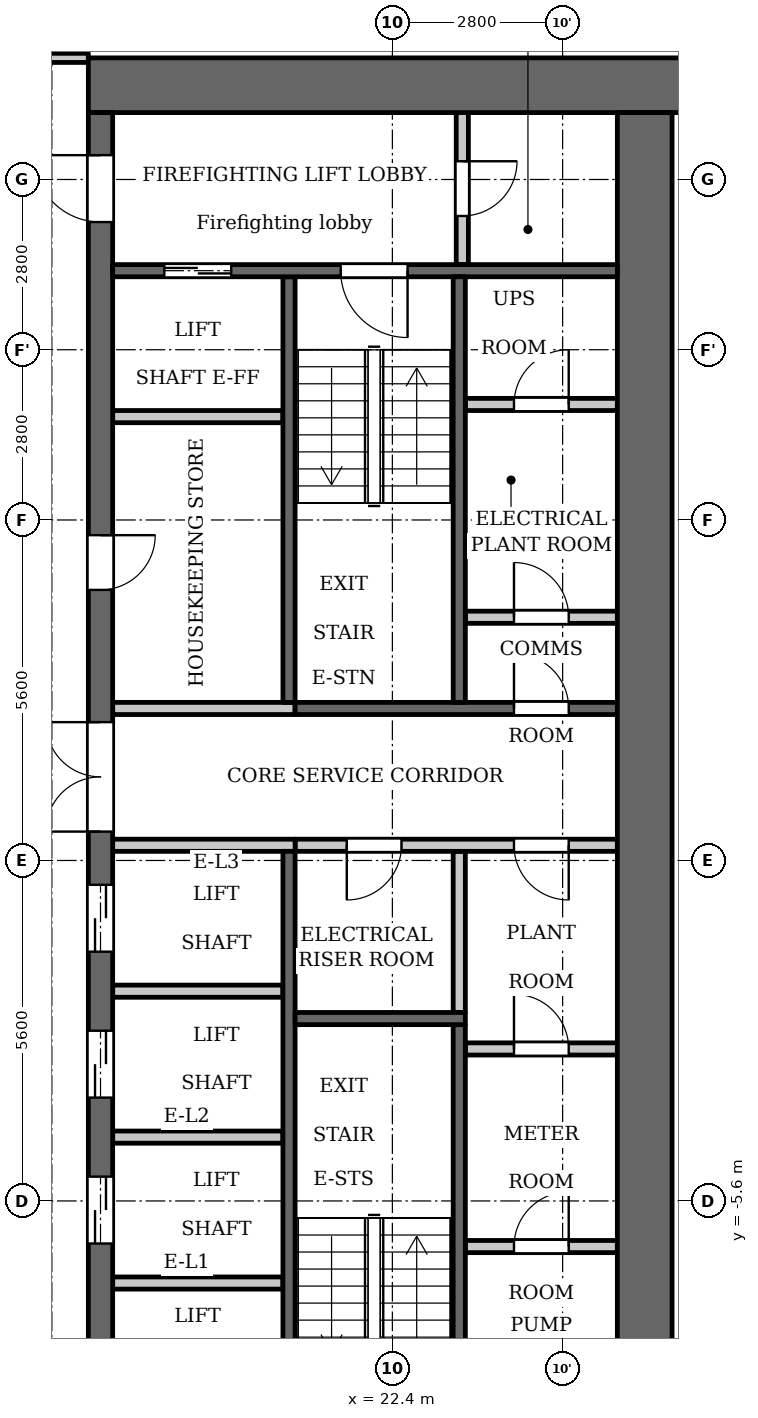
"""IFC4 building model, lengths in metres.
Left out: names, types, materials, properties, quantities, classifications, styles, units other than length and angle.
Written with IfcOpenShell. Run it as: python <this file> out.ifc"""

import sys

from ifc_helpers import new_model, si_unit, direction, frame, frame_2d, origin, place, context, subcontext, project, spatial, rectangle, extrude, element, fill, save


model = new_model("IFC4")
c1 = context("Model", 3, precision=1e-05, world=origin(), true_north=direction((0.0, 1.0)))
c2 = subcontext(c1, "Body", "Model", "MODEL_VIEW")
j1 = project(units=[si_unit("LENGTHUNIT", "METRE"), si_unit("PLANEANGLEUNIT", "RADIAN")], contexts=[c1])
p1 = place(None, origin())
s1 = spatial("IfcSite", under=j1, at=p1, CompositionType="ELEMENT")
p2 = place(p1, origin())
s2 = spatial("IfcBuilding", under=s1, at=p2, CompositionType="ELEMENT")
p3 = place(p2, frame((0.0, 0.0, 114.8)))
s3 = spatial("IfcBuildingStorey", under=s2, at=p3, CompositionType="ELEMENT", Elevation=114.8)
p4 = place(p3, frame((23.5, -2.5, 0.0), z_axis=(0.0, 0.0, 1.0), x_axis=(0.0, 1.0, 0.0)))
e1 = element("IfcWall", 1, at=p4, inside=s3, PredefinedType="PARTITIONING", context=c2, shape_type="SweptSolid", body=[
    extrude(rectangle(XDim=2.65, YDim=0.2, at=frame_2d((1.325, 0.0))), origin(), (0.0, 0.0, 1.0), 3.2),
])
p5 = place(p3, frame((20.7, 2.6, 0.0), z_axis=(0.0, 0.0, 1.0), x_axis=(0.0, 1.0, 0.0)))
e2 = element("IfcWall", 2, at=p5, inside=s3, PredefinedType="SHEAR", context=c2, shape_type="SweptSolid", body=[
    extrude(rectangle(XDim=7.0, YDim=0.2, at=frame_2d((3.5, 0.0))), origin(), (0.0, 0.0, 1.0), 3.2),
])
p6 = place(p3, frame((20.7, -9.6, 0.0), z_axis=(0.0, 0.0, 1.0), x_axis=(0.0, 1.0, 0.0)))
e3 = element("IfcWall", 3, at=p6, inside=s3, PredefinedType="SHEAR", context=c2, shape_type="SweptSolid", body=[
    extrude(rectangle(XDim=9.75, YDim=0.2, at=frame_2d((4.875, 0.0))), origin(), (0.0, 0.0, 1.0), 3.2),
])
p7 = place(p3, frame((20.8, 2.5, 0.0), z_axis=(0.0, 0.0, 1.0), x_axis=(1.0, 0.0, 0.0)))
e4 = element("IfcWall", 4, at=p7, inside=s3, PredefinedType="SHEAR", context=c2, shape_type="SweptSolid", body=[
    extrude(rectangle(XDim=5.3, YDim=0.2, at=frame_2d((2.65, 0.0))), origin(), (0.0, 0.0, 1.0), 3.2),
])
p8 = place(p7, frame((3.6, 0.0, 0.0)))
e5 = element("IfcOpeningElement", 5, at=p8, cuts=e4, PredefinedType="OPENING", context=c2, shape_type="SweptSolid", body=[
    extrude(rectangle(XDim=0.9, YDim=2.1, at=frame_2d((0.45, 1.05))), frame((0.0, 0.11, 0.0), z_axis=(0.0, -1.0, 0.0), x_axis=(1.0, 0.0, 0.0)), (0.0, 0.0, 1.0), 0.22),
])
p9 = place(p3, frame((20.8, 0.25, 0.0), z_axis=(0.0, 0.0, 1.0), x_axis=(1.0, 0.0, 0.0)))
e6 = element("IfcWall", 6, at=p9, inside=s3, PredefinedType="PARTITIONING", context=c2, shape_type="SweptSolid", body=[
    extrude(rectangle(XDim=5.3, YDim=0.2, at=frame_2d((2.65, 0.0))), origin(), (0.0, 0.0, 1.0), 3.2),
])
p10 = place(p9, frame((0.85, 0.0, 0.0)))
e7 = element("IfcOpeningElement", 7, at=p10, cuts=e6, PredefinedType="OPENING", context=c2, shape_type="SweptSolid", body=[
    extrude(rectangle(XDim=0.9, YDim=2.1, at=frame_2d((0.45, 1.05))), frame((0.0, 0.11, 0.0), z_axis=(0.0, -1.0, 0.0), x_axis=(1.0, 0.0, 0.0)), (0.0, 0.0, 1.0), 0.22),
])
p11 = place(p9, frame((3.6, 0.0, 0.0)))
e8 = element("IfcOpeningElement", 8, at=p11, cuts=e6, PredefinedType="OPENING", context=c2, shape_type="SweptSolid", body=[
    extrude(rectangle(XDim=0.9, YDim=2.1, at=frame_2d((0.45, 1.05))), frame((0.0, 0.11, 0.0), z_axis=(0.0, -1.0, 0.0), x_axis=(1.0, 0.0, 0.0)), (0.0, 0.0, 1.0), 0.22),
])
p12 = place(p3, frame((17.4, 12.75, 0.0), z_axis=(0.0, 0.0, 1.0), x_axis=(1.0, 0.0, 0.0)))
e9 = element("IfcWall", 9, at=p12, inside=s3, PredefinedType="SHEAR", context=c2, shape_type="SweptSolid", body=[
    extrude(rectangle(XDim=10.4, YDim=0.9, at=frame_2d((5.2, 0.0))), origin(), (0.0, 0.0, 1.0), 3.2),
])
p13 = place(p3, frame((17.6, -12.3, 0.0), z_axis=(0.0, 0.0, 1.0), x_axis=(0.0, 1.0, 0.0)))
e10 = element("IfcWall", 10, at=p13, inside=s3, PredefinedType="SHEAR", context=c2, shape_type="SweptSolid", body=[
    extrude(rectangle(XDim=24.6, YDim=0.4, at=frame_2d((12.3, 0.0))), origin(), (0.0, 0.0, 1.0), 3.2),
])
p14 = place(p13, frame((6.0, 0.0, 0.0)))
e11 = element("IfcOpeningElement", 11, at=p14, cuts=e10, PredefinedType="OPENING", context=c2, shape_type="SweptSolid", body=[
    extrude(rectangle(XDim=1.1, YDim=2.1, at=frame_2d((0.55, 1.05))), frame((0.0, 0.21, 0.0), z_axis=(0.0, -1.0, 0.0), x_axis=(1.0, 0.0, 0.0)), (0.0, 0.0, 1.0), 0.42),
])
p15 = place(p13, frame((8.4, 0.0, 0.0)))
e12 = element("IfcOpeningElement", 12, at=p15, cuts=e10, PredefinedType="OPENING", context=c2, shape_type="SweptSolid", body=[
    extrude(rectangle(XDim=1.1, YDim=2.1, at=frame_2d((0.55, 1.05))), frame((0.0, 0.21, 0.0), z_axis=(0.0, -1.0, 0.0), x_axis=(1.0, 0.0, 0.0)), (0.0, 0.0, 1.0), 0.42),
])
p16 = place(p13, frame((10.8, 0.0, 0.0)))
e13 = element("IfcOpeningElement", 13, at=p16, cuts=e10, PredefinedType="OPENING", context=c2, shape_type="SweptSolid", body=[
    extrude(rectangle(XDim=1.1, YDim=2.1, at=frame_2d((0.55, 1.05))), frame((0.0, 0.21, 0.0), z_axis=(0.0, -1.0, 0.0), x_axis=(1.0, 0.0, 0.0)), (0.0, 0.0, 1.0), 0.42),
])
p17 = place(p13, frame((16.75, 0.0, 0.0)))
e14 = element("IfcOpeningElement", 14, at=p17, cuts=e10, PredefinedType="OPENING", context=c2, shape_type="SweptSolid", body=[
    extrude(rectangle(XDim=0.9, YDim=2.1, at=frame_2d((0.45, 1.05))), frame((0.0, 0.21, 0.0), z_axis=(0.0, -1.0, 0.0), x_axis=(1.0, 0.0, 0.0)), (0.0, 0.0, 1.0), 0.42),
])
p18 = place(p13, frame((22.8, 0.0, 0.0)))
e15 = element("IfcOpeningElement", 15, at=p18, cuts=e10, PredefinedType="OPENING", context=c2, shape_type="SweptSolid", body=[
    extrude(rectangle(XDim=1.1, YDim=2.1, at=frame_2d((0.55, 1.05))), frame((0.0, 0.21, 0.0), z_axis=(0.0, -1.0, 0.0), x_axis=(1.0, 0.0, 0.0)), (0.0, 0.0, 1.0), 0.42),
])
p19 = place(p13, frame((0.7, 0.0, 0.0)))
e16 = element("IfcOpeningElement", 16, at=p19, cuts=e10, PredefinedType="OPENING", context=c2, shape_type="SweptSolid", body=[
    extrude(rectangle(XDim=1.1, YDim=2.1, at=frame_2d((0.55, 1.05))), frame((0.0, 0.21, 0.0), z_axis=(0.0, -1.0, 0.0), x_axis=(1.0, 0.0, 0.0)), (0.0, 0.0, 1.0), 0.42),
])
p20 = place(p13, frame((12.775, 0.0, 0.0)))
e17 = element("IfcOpeningElement", 17, at=p20, cuts=e10, PredefinedType="OPENING", context=c2, shape_type="SweptSolid", body=[
    extrude(rectangle(XDim=1.8, YDim=2.1, at=frame_2d((0.9, 1.05))), frame((0.0, 0.21, 0.0), z_axis=(0.0, -1.0, 0.0), x_axis=(1.0, 0.0, 0.0)), (0.0, 0.0, 1.0), 0.42),
])
p21 = place(p3, frame((26.55, -12.3, 0.0), z_axis=(0.0, 0.0, 1.0), x_axis=(0.0, 1.0, 0.0)))
e18 = element("IfcWall", 18, at=p21, inside=s3, PredefinedType="SHEAR", context=c2, shape_type="SweptSolid", body=[
    extrude(rectangle(XDim=24.6, YDim=0.9, at=frame_2d((12.3, 0.0))), origin(), (0.0, 0.0, 1.0), 3.2),
])
p22 = place(p3, frame((23.55, 9.8, 0.0), z_axis=(0.0, 0.0, 1.0), x_axis=(0.0, 1.0, 0.0)))
e19 = element("IfcWall", 19, at=p22, inside=s3, PredefinedType="PARTITIONING", context=c2, shape_type="SweptSolid", body=[
    extrude(rectangle(XDim=2.5, YDim=0.2, at=frame_2d((1.25, 0.0))), origin(), (0.0, 0.0, 1.0), 3.2),
])
p23 = place(p22, frame((0.8, 0.0, 0.0)))
e20 = element("IfcOpeningElement", 20, at=p23, cuts=e19, PredefinedType="OPENING", context=c2, shape_type="SweptSolid", body=[
    extrude(rectangle(XDim=0.9, YDim=2.1, at=frame_2d((0.45, 1.05))), frame((0.0, 0.11, 0.0), z_axis=(0.0, -1.0, 0.0), x_axis=(1.0, 0.0, 0.0)), (0.0, 0.0, 1.0), 0.22),
])
p24 = place(p3, frame((23.6, -6.35, 0.0), z_axis=(0.0, 0.0, 1.0), x_axis=(1.0, 0.0, 0.0)))
e21 = element("IfcWall", 21, at=p24, inside=s3, PredefinedType="PARTITIONING", context=c2, shape_type="SweptSolid", body=[
    extrude(rectangle(XDim=2.5, YDim=0.2, at=frame_2d((1.25, 0.0))), origin(), (0.0, 0.0, 1.0), 3.2),
])
p25 = place(p24, frame((0.8, 0.0, 0.0)))
e22 = element("IfcOpeningElement", 22, at=p25, cuts=e21, PredefinedType="OPENING", context=c2, shape_type="SweptSolid", body=[
    extrude(rectangle(XDim=0.9, YDim=2.1, at=frame_2d((0.45, 1.05))), frame((0.0, 0.11, 0.0), z_axis=(0.0, -1.0, 0.0), x_axis=(1.0, 0.0, 0.0)), (0.0, 0.0, 1.0), 0.22),
])
p26 = place(p3, frame((23.6, -3.1, 0.0), z_axis=(0.0, 0.0, 1.0), x_axis=(1.0, 0.0, 0.0)))
e23 = element("IfcWall", 23, at=p26, inside=s3, PredefinedType="PARTITIONING", context=c2, shape_type="SweptSolid", body=[
    extrude(rectangle(XDim=2.5, YDim=0.2, at=frame_2d((1.25, 0.0))), origin(), (0.0, 0.0, 1.0), 3.2),
])
p27 = place(p26, frame((0.8, 0.0, 0.0)))
e24 = element("IfcOpeningElement", 24, at=p27, cuts=e23, PredefinedType="OPENING", context=c2, shape_type="SweptSolid", body=[
    extrude(rectangle(XDim=0.9, YDim=2.1, at=frame_2d((0.45, 1.05))), frame((0.0, 0.11, 0.0), z_axis=(0.0, -1.0, 0.0), x_axis=(1.0, 0.0, 0.0)), (0.0, 0.0, 1.0), 0.22),
])
p28 = place(p3, frame((23.6, 4.0, 0.0), z_axis=(0.0, 0.0, 1.0), x_axis=(1.0, 0.0, 0.0)))
e25 = element("IfcWall", 25, at=p28, inside=s3, PredefinedType="PARTITIONING", context=c2, shape_type="SweptSolid", body=[
    extrude(rectangle(XDim=2.5, YDim=0.2, at=frame_2d((1.25, 0.0))), origin(), (0.0, 0.0, 1.0), 3.2),
])
p29 = place(p28, frame((0.8, 0.0, 0.0)))
e26 = element("IfcOpeningElement", 26, at=p29, cuts=e25, PredefinedType="OPENING", context=c2, shape_type="SweptSolid", body=[
    extrude(rectangle(XDim=0.9, YDim=2.1, at=frame_2d((0.45, 1.05))), frame((0.0, 0.11, 0.0), z_axis=(0.0, -1.0, 0.0), x_axis=(1.0, 0.0, 0.0)), (0.0, 0.0, 1.0), 0.22),
])
p30 = place(p3, frame((23.6, 7.5, 0.0), z_axis=(0.0, 0.0, 1.0), x_axis=(1.0, 0.0, 0.0)))
e27 = element("IfcWall", 27, at=p30, inside=s3, PredefinedType="PARTITIONING", context=c2, shape_type="SweptSolid", body=[
    extrude(rectangle(XDim=2.5, YDim=0.2, at=frame_2d((1.25, 0.0))), origin(), (0.0, 0.0, 1.0), 3.2),
])
p31 = place(p30, frame((0.8, 0.0, 0.0)))
e28 = element("IfcOpeningElement", 28, at=p31, cuts=e27, PredefinedType="OPENING", context=c2, shape_type="SweptSolid", body=[
    extrude(rectangle(XDim=0.9, YDim=2.1, at=frame_2d((0.45, 1.05))), frame((0.0, 0.11, 0.0), z_axis=(0.0, -1.0, 0.0), x_axis=(1.0, 0.0, 0.0)), (0.0, 0.0, 1.0), 0.22),
])
for number, where, z_axis, x_axis in (
    (29, (17.8, -6.95, 0.0), (0.0, 0.0, 1.0), (1.0, 0.0, 0.0)),
    (30, (17.8, -4.55, 0.0), (0.0, 0.0, 1.0), (1.0, 0.0, 0.0)),
    (31, (17.8, -2.15, 0.0), (0.0, 0.0, 1.0), (1.0, 0.0, 0.0)),
):
    element("IfcWall", number, at=place(p3, frame(where, z_axis=z_axis, x_axis=x_axis)), inside=s3, PredefinedType="PARTITIONING", context=c2, shape_type="SweptSolid", body=[
        extrude(rectangle(XDim=2.8, YDim=0.2, at=frame_2d((1.4, 0.0))), origin(), (0.0, 0.0, 1.0), 3.2),
    ])
for number, where, z_axis, x_axis in (
    (32, (17.8, 0.25, 0.0), (0.0, 0.0, 1.0), (1.0, 0.0, 0.0)),
    (33, (17.8, 2.5, 0.0), (0.0, 0.0, 1.0), (1.0, 0.0, 0.0)),
):
    element("IfcWall", number, at=place(p3, frame(where, z_axis=z_axis, x_axis=x_axis)), inside=s3, PredefinedType="PARTITIONING", context=c2, shape_type="SweptSolid", body=[
        extrude(rectangle(XDim=3.0, YDim=0.2, at=frame_2d((1.5, 0.0))), origin(), (0.0, 0.0, 1.0), 3.2),
    ])
p32 = place(p3, frame((17.8, 7.3, 0.0), z_axis=(0.0, 0.0, 1.0), x_axis=(1.0, 0.0, 0.0)))
e34 = element("IfcWall", 34, at=p32, inside=s3, PredefinedType="PARTITIONING", context=c2, shape_type="SweptSolid", body=[
    extrude(rectangle(XDim=2.8, YDim=0.2, at=frame_2d((1.4, 0.0))), origin(), (0.0, 0.0, 1.0), 3.2),
])
p33 = place(p3, frame((17.8, 9.7, 0.0), z_axis=(0.0, 0.0, 1.0), x_axis=(1.0, 0.0, 0.0)))
e35 = element("IfcWall", 35, at=p33, inside=s3, PredefinedType="SHEAR", context=c2, shape_type="SweptSolid", body=[
    extrude(rectangle(XDim=8.3, YDim=0.2, at=frame_2d((4.15, 0.0))), origin(), (0.0, 0.0, 1.0), 3.2),
])
p34 = place(p33, frame((0.85, 0.0, 0.0)))
e36 = element("IfcOpeningElement", 36, at=p34, cuts=e35, PredefinedType="OPENING", context=c2, shape_type="SweptSolid", body=[
    extrude(rectangle(XDim=1.1, YDim=2.1, at=frame_2d((0.55, 1.05))), frame((0.0, 0.11, 0.0), z_axis=(0.0, -1.0, 0.0), x_axis=(1.0, 0.0, 0.0)), (0.0, 0.0, 1.0), 0.22),
])
p35 = place(p33, frame((3.75, 0.0, 0.0)))
e37 = element("IfcOpeningElement", 37, at=p35, cuts=e35, PredefinedType="OPENING", context=c2, shape_type="SweptSolid", body=[
    extrude(rectangle(XDim=1.1, YDim=2.1, at=frame_2d((0.55, 1.05))), frame((0.0, 0.11, 0.0), z_axis=(0.0, -1.0, 0.0), x_axis=(1.0, 0.0, 0.0)), (0.0, 0.0, 1.0), 0.22),
])
p36 = place(p3, frame((23.5, 2.6, 0.0), z_axis=(0.0, 0.0, 1.0), x_axis=(0.0, 1.0, 0.0)))
e38 = element("IfcWall", 38, at=p36, inside=s3, PredefinedType="SHEAR", context=c2, shape_type="SweptSolid", body=[
    extrude(rectangle(XDim=7.0, YDim=0.2, at=frame_2d((3.5, 0.0))), origin(), (0.0, 0.0, 1.0), 3.2),
])
p37 = place(p3, frame((23.5, -9.6, 0.0), z_axis=(0.0, 0.0, 1.0), x_axis=(0.0, 1.0, 0.0)))
e39 = element("IfcWall", 39, at=p37, inside=s3, PredefinedType="SHEAR", context=c2, shape_type="SweptSolid", body=[
    extrude(rectangle(XDim=6.9, YDim=0.2, at=frame_2d((3.45, 0.0))), origin(), (0.0, 0.0, 1.0), 3.2),
])
p38 = place(p3, frame((20.8, -2.6, 0.0), z_axis=(0.0, 0.0, 1.0), x_axis=(1.0, 0.0, 0.0)))
e40 = element("IfcWall", 40, at=p38, inside=s3, PredefinedType="SHEAR", context=c2, shape_type="SweptSolid", body=[
    extrude(rectangle(XDim=2.8, YDim=0.2, at=frame_2d((1.4, 0.0))), origin(), (0.0, 0.0, 1.0), 3.2),
])
p39 = place(p3, frame((-17.4, 13.2, 0.0), z_axis=(0.0, 0.0, 1.0), x_axis=(1.0, 0.0, 0.0)))
e41 = element("IfcWall", 41, at=p39, inside=s3, PredefinedType="PARTITIONING", context=c2, shape_type="SweptSolid", body=[
    extrude(rectangle(XDim=34.8, YDim=0.15, at=frame_2d((17.4, 0.0))), origin(), (0.0, 0.0, 1.0), 3.2),
])
p40 = place(p39, frame((0.75, 0.0, 0.0)))
e42 = element("IfcOpeningElement", 42, at=p40, cuts=e41, PredefinedType="OPENING", context=c2, shape_type="SweptSolid", body=[
    extrude(rectangle(XDim=1.0, YDim=2.1, at=frame_2d((0.5, 1.05))), frame((0.0, 0.085, 0.0), z_axis=(0.0, -1.0, 0.0), x_axis=(1.0, 0.0, 0.0)), (0.0, 0.0, 1.0), 0.17),
])
p41 = place(p39, frame((33.15, 0.0, 0.0)))
e43 = element("IfcOpeningElement", 43, at=p41, cuts=e41, PredefinedType="OPENING", context=c2, shape_type="SweptSolid", body=[
    extrude(rectangle(XDim=1.0, YDim=2.1, at=frame_2d((0.5, 1.05))), frame((0.0, 0.085, 0.0), z_axis=(0.0, -1.0, 0.0), x_axis=(1.0, 0.0, 0.0)), (0.0, 0.0, 1.0), 0.17),
])
p42 = place(p39, frame((6.85, 0.0, 0.0)))
e44 = element("IfcOpeningElement", 44, at=p42, cuts=e41, PredefinedType="OPENING", context=c2, shape_type="SweptSolid", body=[
    extrude(rectangle(XDim=1.0, YDim=2.1, at=frame_2d((0.5, 1.05))), frame((0.0, 0.085, 0.0), z_axis=(0.0, -1.0, 0.0), x_axis=(1.0, 0.0, 0.0)), (0.0, 0.0, 1.0), 0.17),
])
p43 = place(p39, frame((12.45, 0.0, 0.0)))
e45 = element("IfcOpeningElement", 45, at=p43, cuts=e41, PredefinedType="OPENING", context=c2, shape_type="SweptSolid", body=[
    extrude(rectangle(XDim=1.0, YDim=2.1, at=frame_2d((0.5, 1.05))), frame((0.0, 0.085, 0.0), z_axis=(0.0, -1.0, 0.0), x_axis=(1.0, 0.0, 0.0)), (0.0, 0.0, 1.0), 0.17),
])
p44 = place(p39, frame((29.25, 0.0, 0.0)))
e46 = element("IfcOpeningElement", 46, at=p44, cuts=e41, PredefinedType="OPENING", context=c2, shape_type="SweptSolid", body=[
    extrude(rectangle(XDim=1.0, YDim=2.1, at=frame_2d((0.5, 1.05))), frame((0.0, 0.085, 0.0), z_axis=(0.0, -1.0, 0.0), x_axis=(1.0, 0.0, 0.0)), (0.0, 0.0, 1.0), 0.17),
])
p45 = place(p14, origin())
e47 = element("IfcDoor", 47, at=p45, inside=s3, OperationType="DOUBLE_DOOR_SLIDING", PredefinedType="DOOR", context=c2, shape_type="SweptSolid", body=[
    extrude(rectangle(XDim=1.1, YDim=2.1, at=frame_2d((0.55, 1.05))), frame((0.0, 0.025, 0.0), z_axis=(0.0, -1.0, 0.0), x_axis=(1.0, 0.0, 0.0)), (0.0, 0.0, 1.0), 0.05),
])
fill(e11, e47)
p46 = place(p15, origin())
e48 = element("IfcDoor", 48, at=p46, inside=s3, OperationType="DOUBLE_DOOR_SLIDING", PredefinedType="DOOR", context=c2, shape_type="SweptSolid", body=[
    extrude(rectangle(XDim=1.1, YDim=2.1, at=frame_2d((0.55, 1.05))), frame((0.0, 0.025, 0.0), z_axis=(0.0, -1.0, 0.0), x_axis=(1.0, 0.0, 0.0)), (0.0, 0.0, 1.0), 0.05),
])
fill(e12, e48)
p47 = place(p16, origin())
e49 = element("IfcDoor", 49, at=p47, inside=s3, OperationType="DOUBLE_DOOR_SLIDING", PredefinedType="DOOR", context=c2, shape_type="SweptSolid", body=[
    extrude(rectangle(XDim=1.1, YDim=2.1, at=frame_2d((0.55, 1.05))), frame((0.0, 0.025, 0.0), z_axis=(0.0, -1.0, 0.0), x_axis=(1.0, 0.0, 0.0)), (0.0, 0.0, 1.0), 0.05),
])
fill(e13, e49)
p48 = place(p17, origin())
e50 = element("IfcDoor", 50, at=p48, inside=s3, OperationType="SINGLE_SWING_RIGHT", PredefinedType="DOOR", context=c2, shape_type="SweptSolid", body=[
    extrude(rectangle(XDim=0.9, YDim=2.1, at=frame_2d((0.45, 1.05))), frame((0.0, 0.025, 0.0), z_axis=(0.0, -1.0, 0.0), x_axis=(1.0, 0.0, 0.0)), (0.0, 0.0, 1.0), 0.05),
])
fill(e14, e50)
p49 = place(p34, origin())
e51 = element("IfcDoor", 51, at=p49, inside=s3, OperationType="DOUBLE_DOOR_SLIDING", PredefinedType="DOOR", context=c2, shape_type="SweptSolid", body=[
    extrude(rectangle(XDim=1.1, YDim=2.1, at=frame_2d((0.55, 1.05))), frame((0.0, 0.025, 0.0), z_axis=(0.0, -1.0, 0.0), x_axis=(1.0, 0.0, 0.0)), (0.0, 0.0, 1.0), 0.05),
])
fill(e36, e51)
p50 = place(p18, origin())
e52 = element("IfcDoor", 52, at=p50, inside=s3, OperationType="SINGLE_SWING_LEFT", PredefinedType="DOOR", context=c2, shape_type="SweptSolid", body=[
    extrude(rectangle(XDim=1.1, YDim=2.1, at=frame_2d((0.55, 1.05))), frame((0.0, 0.025, 0.0), z_axis=(0.0, -1.0, 0.0), x_axis=(1.0, 0.0, 0.0)), (0.0, 0.0, 1.0), 0.05),
])
fill(e15, e52)
p51 = place(p23, origin())
e53 = element("IfcDoor", 53, at=p51, inside=s3, OperationType="SINGLE_SWING_RIGHT", PredefinedType="DOOR", context=c2, shape_type="SweptSolid", body=[
    extrude(rectangle(XDim=0.9, YDim=2.1, at=frame_2d((0.45, 1.05))), frame((0.0, 0.025, 0.0), z_axis=(0.0, -1.0, 0.0), x_axis=(1.0, 0.0, 0.0)), (0.0, 0.0, 1.0), 0.05),
])
fill(e20, e53)
p52 = place(p35, origin())
e54 = element("IfcDoor", 54, at=p52, inside=s3, OperationType="SINGLE_SWING_RIGHT", PredefinedType="DOOR", context=c2, shape_type="SweptSolid", body=[
    extrude(rectangle(XDim=1.1, YDim=2.1, at=frame_2d((0.55, 1.05))), frame((0.0, 0.025, 0.0), z_axis=(0.0, -1.0, 0.0), x_axis=(1.0, 0.0, 0.0)), (0.0, 0.0, 1.0), 0.05),
])
fill(e37, e54)
p53 = place(p20, origin())
e55 = element("IfcDoor", 55, at=p53, inside=s3, OperationType="DOUBLE_DOOR_SINGLE_SWING", PredefinedType="DOOR", context=c2, shape_type="SweptSolid", body=[
    extrude(rectangle(XDim=1.8, YDim=2.1, at=frame_2d((0.9, 1.05))), frame((0.0, 0.025, 0.0), z_axis=(0.0, -1.0, 0.0), x_axis=(1.0, 0.0, 0.0)), (0.0, 0.0, 1.0), 0.05),
])
fill(e17, e55)
p54 = place(p10, origin())
e56 = element("IfcDoor", 56, at=p54, inside=s3, OperationType="SINGLE_SWING_LEFT", PredefinedType="DOOR", context=c2, shape_type="SweptSolid", body=[
    extrude(rectangle(XDim=0.9, YDim=2.1, at=frame_2d((0.45, 1.05))), frame((0.0, 0.025, 0.0), z_axis=(0.0, -1.0, 0.0), x_axis=(1.0, 0.0, 0.0)), (0.0, 0.0, 1.0), 0.05),
])
fill(e7, e56)
p55 = place(p25, origin())
e57 = element("IfcDoor", 57, at=p55, inside=s3, OperationType="SINGLE_SWING_LEFT", PredefinedType="DOOR", context=c2, shape_type="SweptSolid", body=[
    extrude(rectangle(XDim=0.9, YDim=2.1, at=frame_2d((0.45, 1.05))), frame((0.0, 0.025, 0.0), z_axis=(0.0, -1.0, 0.0), x_axis=(1.0, 0.0, 0.0)), (0.0, 0.0, 1.0), 0.05),
])
fill(e22, e57)
p56 = place(p27, origin())
e58 = element("IfcDoor", 58, at=p56, inside=s3, OperationType="SINGLE_SWING_RIGHT", PredefinedType="DOOR", context=c2, shape_type="SweptSolid", body=[
    extrude(rectangle(XDim=0.9, YDim=2.1, at=frame_2d((0.45, 1.05))), frame((0.0, 0.025, 0.0), z_axis=(0.0, -1.0, 0.0), x_axis=(1.0, 0.0, 0.0)), (0.0, 0.0, 1.0), 0.05),
])
fill(e24, e58)
p57 = place(p11, origin())
e59 = element("IfcDoor", 59, at=p57, inside=s3, OperationType="SINGLE_SWING_RIGHT", PredefinedType="DOOR", context=c2, shape_type="SweptSolid", body=[
    extrude(rectangle(XDim=0.9, YDim=2.1, at=frame_2d((0.45, 1.05))), frame((0.0, 0.025, 0.0), z_axis=(0.0, -1.0, 0.0), x_axis=(1.0, 0.0, 0.0)), (0.0, 0.0, 1.0), 0.05),
])
fill(e8, e59)
p58 = place(p29, origin())
e60 = element("IfcDoor", 60, at=p58, inside=s3, OperationType="SINGLE_SWING_RIGHT", PredefinedType="DOOR", context=c2, shape_type="SweptSolid", body=[
    extrude(rectangle(XDim=0.9, YDim=2.1, at=frame_2d((0.45, 1.05))), frame((0.0, 0.025, 0.0), z_axis=(0.0, -1.0, 0.0), x_axis=(1.0, 0.0, 0.0)), (0.0, 0.0, 1.0), 0.05),
])
fill(e26, e60)
p59 = place(p31, origin())
e61 = element("IfcDoor", 61, at=p59, inside=s3, OperationType="SINGLE_SWING_LEFT", PredefinedType="DOOR", context=c2, shape_type="SweptSolid", body=[
    extrude(rectangle(XDim=0.9, YDim=2.1, at=frame_2d((0.45, 1.05))), frame((0.0, 0.025, 0.0), z_axis=(0.0, -1.0, 0.0), x_axis=(1.0, 0.0, 0.0)), (0.0, 0.0, 1.0), 0.05),
])
fill(e28, e61)
p60 = place(p8, origin())
e62 = element("IfcDoor", 62, at=p60, inside=s3, OperationType="SINGLE_SWING_RIGHT", PredefinedType="DOOR", context=c2, shape_type="SweptSolid", body=[
    extrude(rectangle(XDim=0.9, YDim=2.1, at=frame_2d((0.45, 1.05))), frame((0.0, 0.025, 0.0), z_axis=(0.0, -1.0, 0.0), x_axis=(1.0, 0.0, 0.0)), (0.0, 0.0, 1.0), 0.05),
])
fill(e5, e62)
save(model, sys.argv[1])
